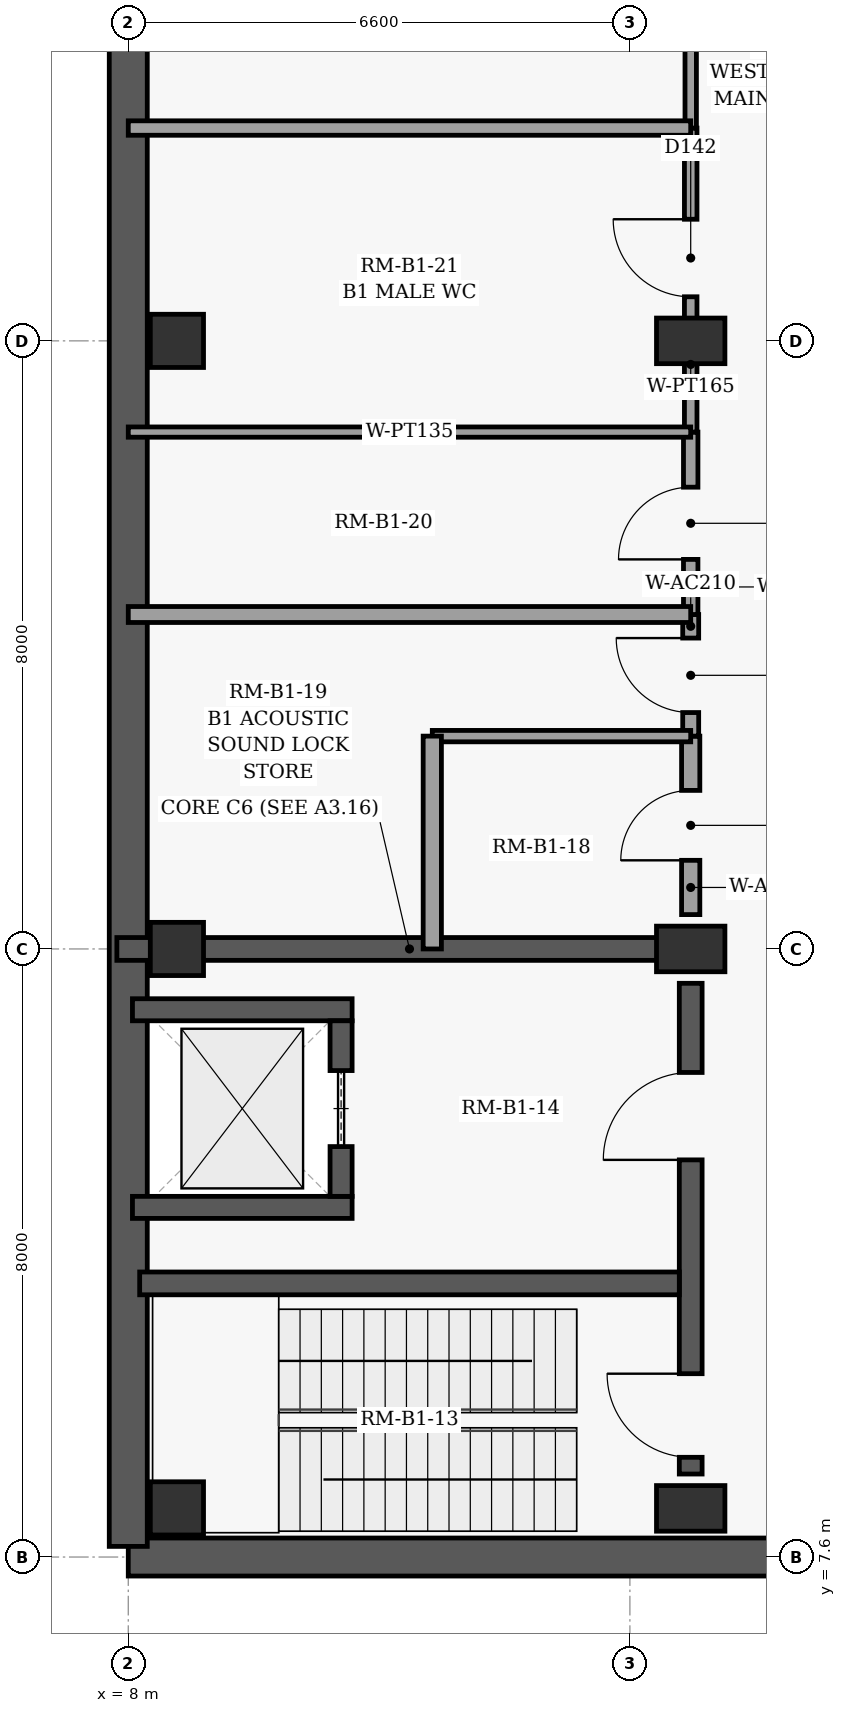
"""IFC4 building model, lengths in metres.
Left out: names, types, materials, properties, quantities, classifications, styles, units other than length and angle.
Written with IfcOpenShell. Run it as: python <this file> out.ifc"""

import sys

from ifc_helpers import new_model, si_unit, direction, frame, frame_2d, origin, origin_2d, place, context, subcontext, project, spatial, rectangle, extrude, element, fill, save


model = new_model("IFC4")
c1 = context("Model", 3, precision=1e-05, world=origin(), true_north=direction((0.0, 1.0)))
c2 = subcontext(c1, "Body", "Model", "MODEL_VIEW")
j1 = project(units=[si_unit("LENGTHUNIT", "METRE"), si_unit("PLANEANGLEUNIT", "RADIAN")], contexts=[c1])
p1 = place(None, origin())
s1 = spatial("IfcSite", under=j1, at=p1, CompositionType="ELEMENT")
p2 = place(p1, origin())
s2 = spatial("IfcBuilding", under=s1, at=p2, CompositionType="ELEMENT")
p3 = place(p2, frame((0.0, 0.0, -4.8)))
s3 = spatial("IfcBuildingStorey", under=s2, at=p3, CompositionType="ELEMENT", Elevation=-4.8)
for number, where, z_axis, x_axis in (
    (1, (8.64, 8.24, 0.0), (0.0, 0.0, 1.0), (1.0, 0.0, 0.0)),
    (2, (8.64, 15.6, 0.0), (0.0, 0.0, 1.0), (1.0, 0.0, 0.0)),
    (3, (8.64, 23.6, 0.0), (0.0, 0.0, 1.0), (1.0, 0.0, 0.0)),
):
    element("IfcColumn", number, at=place(p3, frame(where, z_axis=z_axis, x_axis=x_axis)), inside=s3, PredefinedType="COLUMN", context=c2, shape_type="SweptSolid", body=[
        extrude(rectangle(XDim=0.7, YDim=0.7, at=origin_2d()), origin(), (0.0, 0.0, 1.0), 4.8),
    ])
for number, where, z_axis, x_axis in (
    (4, (15.4, 8.24, 0.0), (0.0, 0.0, 1.0), (1.0, 0.0, 0.0)),
    (5, (15.4, 15.6, 0.0), (0.0, 0.0, 1.0), (1.0, 0.0, 0.0)),
    (6, (15.4, 23.6, 0.0), (0.0, 0.0, 1.0), (1.0, 0.0, 0.0)),
):
    element("IfcColumn", number, at=place(p3, frame(where, z_axis=z_axis, x_axis=x_axis)), inside=s3, PredefinedType="COLUMN", context=c2, shape_type="SweptSolid", body=[
        extrude(rectangle(XDim=0.6, YDim=0.9, at=origin_2d()), origin(), (0.0, 0.0, 1.0), 4.8),
    ])
p4 = place(p3, frame((46.0, 7.6, 0.0), z_axis=(0.0, 0.0, 1.0), x_axis=(-1.0, 0.0, 0.0)))
e7 = element("IfcWall", 7, at=p4, inside=s3, PredefinedType="USERDEFINED", context=c2, shape_type="SweptSolid", body=[
    extrude(rectangle(XDim=38.0, YDim=0.5, at=frame_2d((19.0, 0.0))), origin(), (0.0, 0.0, 1.0), 4.5),
])
p5 = place(p3, frame((8.0, 7.74, 0.0), z_axis=(0.0, 0.0, 1.0), x_axis=(0.0, 1.0, 0.0)))
e8 = element("IfcWall", 8, at=p5, inside=s3, PredefinedType="USERDEFINED", context=c2, shape_type="SweptSolid", body=[
    extrude(rectangle(XDim=55.72, YDim=0.5, at=frame_2d((27.86, 0.0))), origin(), (0.0, 0.0, 1.0), 4.5),
])
p6 = place(p3, frame((7.85, 15.6, 0.0), z_axis=(0.0, 0.0, 1.0), x_axis=(1.0, 0.0, 0.0)))
e9 = element("IfcWall", 9, at=p6, inside=s3, PredefinedType="SHEAR", context=c2, shape_type="SweptSolid", body=[
    extrude(rectangle(XDim=7.248, YDim=0.3, at=frame_2d((3.624, 0.0))), origin(), (0.0, 0.0, 1.0), 4.5),
])
p7 = place(p3, frame((15.4, 8.692, 0.0), z_axis=(0.0, 0.0, 1.0), x_axis=(0.0, 1.0, 0.0)))
e10 = element("IfcWall", 10, at=p7, inside=s3, PredefinedType="SHEAR", context=c2, shape_type="SweptSolid", body=[
    extrude(rectangle(XDim=6.456, YDim=0.3, at=frame_2d((3.228, 0.0))), origin(), (0.0, 0.0, 1.0), 4.5),
])
p8 = place(p7, frame((0.22, 0.0, 0.0)))
e11 = element("IfcOpeningElement", 11, at=p8, cuts=e10, PredefinedType="OPENING", context=c2, shape_type="SweptSolid", body=[
    extrude(rectangle(XDim=1.1, YDim=2.15, at=frame_2d((0.55, 1.075))), frame((0.0, 0.16, 0.0), z_axis=(0.0, -1.0, 0.0), x_axis=(1.0, 0.0, 0.0)), (0.0, 0.0, 1.0), 0.32),
])
p9 = place(p7, frame((4.133, 0.0, 0.0)))
e12 = element("IfcOpeningElement", 12, at=p9, cuts=e10, PredefinedType="OPENING", context=c2, shape_type="SweptSolid", body=[
    extrude(rectangle(XDim=1.15, YDim=2.2, at=frame_2d((0.575, 1.1))), frame((0.0, 0.16, 0.0), z_axis=(0.0, -1.0, 0.0), x_axis=(1.0, 0.0, 0.0)), (0.0, 0.0, 1.0), 0.32),
])
p10 = place(p3, frame((8.15, 11.2, 0.0), z_axis=(0.0, 0.0, 1.0), x_axis=(1.0, 0.0, 0.0)))
e13 = element("IfcWall", 13, at=p10, inside=s3, PredefinedType="SHEAR", context=c2, shape_type="SweptSolid", body=[
    extrude(rectangle(XDim=7.1, YDim=0.3, at=frame_2d((3.55, 0.0))), origin(), (0.0, 0.0, 1.0), 4.5),
])
for number, where, z_axis, x_axis in (
    (14, (8.055, 12.2, 0.0), (0.0, 0.0, 1.0), (1.0, 0.0, 0.0)),
    (15, (8.055, 14.8, 0.0), (0.0, 0.0, 1.0), (1.0, 0.0, 0.0)),
):
    element("IfcWall", number, at=place(p3, frame(where, z_axis=z_axis, x_axis=x_axis)), inside=s3, PredefinedType="SHEAR", context=c2, shape_type="SweptSolid", body=[
        extrude(rectangle(XDim=2.89, YDim=0.29, at=frame_2d((1.445, 0.0))), origin(), (0.0, 0.0, 1.0), 4.5),
    ])
p11 = place(p3, frame((10.8, 12.345, 0.0), z_axis=(0.0, 0.0, 1.0), x_axis=(0.0, 1.0, 0.0)))
e16 = element("IfcWall", 16, at=p11, inside=s3, PredefinedType="SHEAR", context=c2, shape_type="SweptSolid", body=[
    extrude(rectangle(XDim=2.31, YDim=0.29, at=frame_2d((1.155, 0.0))), origin(), (0.0, 0.0, 1.0), 4.5),
])
p12 = place(p11, frame((0.655, 0.0, 0.0)))
e17 = element("IfcOpeningElement", 17, at=p12, cuts=e16, PredefinedType="OPENING", context=c2, shape_type="SweptSolid", body=[
    extrude(rectangle(XDim=1.0, YDim=2.15, at=frame_2d((0.5, 1.075))), frame((0.0, 0.155, 0.0), z_axis=(0.0, -1.0, 0.0), x_axis=(1.0, 0.0, 0.0)), (0.0, 0.0, 1.0), 0.31),
])
p13 = place(p3, frame((15.4, 16.052, 0.0), z_axis=(0.0, 0.0, 1.0), x_axis=(0.0, 1.0, 0.0)))
e18 = element("IfcWall", 18, at=p13, inside=s3, PredefinedType="PARTITIONING", context=c2, shape_type="SweptSolid", body=[
    extrude(rectangle(XDim=2.348, YDim=0.24, at=frame_2d((1.174, 0.0))), origin(), (0.0, 0.0, 1.0), 3.65),
])
p14 = place(p13, frame((0.714, 0.0, 0.0)))
e19 = element("IfcOpeningElement", 19, at=p14, cuts=e18, PredefinedType="OPENING", context=c2, shape_type="SweptSolid", body=[
    extrude(rectangle(XDim=0.92, YDim=2.1, at=frame_2d((0.46, 1.05))), frame((0.0, 0.13, 0.0), z_axis=(0.0, -1.0, 0.0), x_axis=(1.0, 0.0, 0.0)), (0.0, 0.0, 1.0), 0.26),
])
p15 = place(p3, frame((15.4, 18.4, 0.0), z_axis=(0.0, 0.0, 1.0), x_axis=(0.0, 1.0, 0.0)))
e20 = element("IfcWall", 20, at=p15, inside=s3, PredefinedType="PARTITIONING", context=c2, shape_type="SweptSolid", body=[
    extrude(rectangle(XDim=1.6, YDim=0.21, at=frame_2d((0.8, 0.0))), origin(), (0.0, 0.0, 1.0), 3.65),
])
p16 = place(p15, frame((0.31, 0.0, 0.0)))
e21 = element("IfcOpeningElement", 21, at=p16, cuts=e20, PredefinedType="OPENING", context=c2, shape_type="SweptSolid", body=[
    extrude(rectangle(XDim=0.98, YDim=2.1, at=frame_2d((0.49, 1.05))), frame((0.0, 0.115, 0.0), z_axis=(0.0, -1.0, 0.0), x_axis=(1.0, 0.0, 0.0)), (0.0, 0.0, 1.0), 0.23),
])
p17 = place(p3, frame((15.4, 20.0, 0.0), z_axis=(0.0, 0.0, 1.0), x_axis=(0.0, 1.0, 0.0)))
e22 = element("IfcWall", 22, at=p17, inside=s3, PredefinedType="PARTITIONING", context=c2, shape_type="SweptSolid", body=[
    extrude(rectangle(XDim=2.4, YDim=0.19, at=frame_2d((1.2, 0.0))), origin(), (0.0, 0.0, 1.0), 3.65),
])
p18 = place(p17, frame((0.725, 0.0, 0.0)))
e23 = element("IfcOpeningElement", 23, at=p18, cuts=e22, PredefinedType="OPENING", context=c2, shape_type="SweptSolid", body=[
    extrude(rectangle(XDim=0.95, YDim=2.1, at=frame_2d((0.475, 1.05))), frame((0.0, 0.105, 0.0), z_axis=(0.0, -1.0, 0.0), x_axis=(1.0, 0.0, 0.0)), (0.0, 0.0, 1.0), 0.21),
])
p19 = place(p3, frame((15.4, 22.4, 0.0), z_axis=(0.0, 0.0, 1.0), x_axis=(0.0, 1.0, 0.0)))
e24 = element("IfcWall", 24, at=p19, inside=s3, PredefinedType="PARTITIONING", context=c2, shape_type="SweptSolid", body=[
    extrude(rectangle(XDim=4.0, YDim=0.165, at=frame_2d((2.0, 0.0))), origin(), (0.0, 0.0, 1.0), 3.65),
])
p20 = place(p19, frame((1.78, 0.0, 0.0)))
e25 = element("IfcOpeningElement", 25, at=p20, cuts=e24, PredefinedType="OPENING", context=c2, shape_type="SweptSolid", body=[
    extrude(rectangle(XDim=1.02, YDim=2.1, at=frame_2d((0.51, 1.05))), frame((0.0, 0.093, 0.0), z_axis=(0.0, -1.0, 0.0), x_axis=(1.0, 0.0, 0.0)), (0.0, 0.0, 1.0), 0.185),
])
p21 = place(p3, frame((15.4, 26.4, 0.0), z_axis=(0.0, 0.0, 1.0), x_axis=(0.0, 1.0, 0.0)))
e26 = element("IfcWall", 26, at=p21, inside=s3, PredefinedType="PARTITIONING", context=c2, shape_type="SweptSolid", body=[
    extrude(rectangle(XDim=17.6, YDim=0.15, at=frame_2d((8.8, 0.0))), origin(), (0.0, 0.0, 1.0), 3.65),
])
p22 = place(p21, frame((8.3, 0.0, 0.0)))
e27 = element("IfcOpeningElement", 27, at=p22, cuts=e26, PredefinedType="OPENING", context=c2, shape_type="SweptSolid", body=[
    extrude(rectangle(XDim=1.0, YDim=2.1, at=frame_2d((0.5, 1.05))), frame((0.0, 0.085, 0.0), z_axis=(0.0, -1.0, 0.0), x_axis=(1.0, 0.0, 0.0)), (0.0, 0.0, 1.0), 0.17),
])
p23 = place(p3, frame((12.0, 18.4, 0.0), z_axis=(0.0, 0.0, 1.0), x_axis=(1.0, 0.0, 0.0)))
e28 = element("IfcWall", 28, at=p23, inside=s3, PredefinedType="PARTITIONING", context=c2, shape_type="SweptSolid", body=[
    extrude(rectangle(XDim=3.4, YDim=0.15, at=frame_2d((1.7, 0.0))), origin(), (0.0, 0.0, 1.0), 4.5),
])
p24 = place(p3, frame((12.0, 15.6, 0.0), z_axis=(0.0, 0.0, 1.0), x_axis=(0.0, 1.0, 0.0)))
e29 = element("IfcWall", 29, at=p24, inside=s3, PredefinedType="PARTITIONING", context=c2, shape_type="SweptSolid", body=[
    extrude(rectangle(XDim=2.8, YDim=0.24, at=frame_2d((1.4, 0.0))), origin(), (0.0, 0.0, 1.0), 4.5),
])
p25 = place(p3, frame((8.0, 20.0, 0.0), z_axis=(0.0, 0.0, 1.0), x_axis=(1.0, 0.0, 0.0)))
e30 = element("IfcWall", 30, at=p25, inside=s3, PredefinedType="PARTITIONING", context=c2, shape_type="SweptSolid", body=[
    extrude(rectangle(XDim=7.4, YDim=0.21, at=frame_2d((3.7, 0.0))), origin(), (0.0, 0.0, 1.0), 4.5),
])
p26 = place(p3, frame((8.0, 22.4, 0.0), z_axis=(0.0, 0.0, 1.0), x_axis=(1.0, 0.0, 0.0)))
e31 = element("IfcWall", 31, at=p26, inside=s3, PredefinedType="PARTITIONING", context=c2, shape_type="SweptSolid", body=[
    extrude(rectangle(XDim=7.4, YDim=0.135, at=frame_2d((3.7, 0.0))), origin(), (0.0, 0.0, 1.0), 4.5),
])
p27 = place(p3, frame((8.0, 26.4, 0.0), z_axis=(0.0, 0.0, 1.0), x_axis=(1.0, 0.0, 0.0)))
e32 = element("IfcWall", 32, at=p27, inside=s3, PredefinedType="PARTITIONING", context=c2, shape_type="SweptSolid", body=[
    extrude(rectangle(XDim=7.4, YDim=0.19, at=frame_2d((3.7, 0.0))), origin(), (0.0, 0.0, 1.0), 4.5),
])
p28 = place(p8, origin())
e33 = element("IfcDoor", 33, at=p28, inside=s3, OperationType="SINGLE_SWING_RIGHT", PredefinedType="DOOR", context=c2, shape_type="SweptSolid", body=[
    extrude(rectangle(XDim=1.1, YDim=2.15, at=frame_2d((0.55, 1.075))), frame((0.0, 0.025, 0.0), z_axis=(0.0, -1.0, 0.0), x_axis=(1.0, 0.0, 0.0)), (0.0, 0.0, 1.0), 0.05),
])
fill(e11, e33)
p29 = place(p9, origin())
e34 = element("IfcDoor", 34, at=p29, inside=s3, OperationType="SINGLE_SWING_LEFT", PredefinedType="DOOR", context=c2, shape_type="SweptSolid", body=[
    extrude(rectangle(XDim=1.15, YDim=2.2, at=frame_2d((0.575, 1.1))), frame((0.0, 0.025, 0.0), z_axis=(0.0, -1.0, 0.0), x_axis=(1.0, 0.0, 0.0)), (0.0, 0.0, 1.0), 0.05),
])
fill(e12, e34)
p30 = place(p12, origin())
e35 = element("IfcDoor", 35, at=p30, inside=s3, OperationType="SLIDING_TO_LEFT", PredefinedType="DOOR", context=c2, shape_type="SweptSolid", body=[
    extrude(rectangle(XDim=1.0, YDim=2.15, at=frame_2d((0.5, 1.075))), frame((0.0, 0.025, 0.0), z_axis=(0.0, -1.0, 0.0), x_axis=(1.0, 0.0, 0.0)), (0.0, 0.0, 1.0), 0.05),
])
fill(e17, e35)
p31 = place(p14, origin())
e36 = element("IfcDoor", 36, at=p31, inside=s3, OperationType="SINGLE_SWING_LEFT", PredefinedType="DOOR", context=c2, shape_type="SweptSolid", body=[
    extrude(rectangle(XDim=0.92, YDim=2.1, at=frame_2d((0.46, 1.05))), frame((0.0, 0.025, 0.0), z_axis=(0.0, -1.0, 0.0), x_axis=(1.0, 0.0, 0.0)), (0.0, 0.0, 1.0), 0.05),
])
fill(e19, e36)
p32 = place(p16, origin())
e37 = element("IfcDoor", 37, at=p32, inside=s3, OperationType="SINGLE_SWING_RIGHT", PredefinedType="DOOR", context=c2, shape_type="SweptSolid", body=[
    extrude(rectangle(XDim=0.98, YDim=2.1, at=frame_2d((0.49, 1.05))), frame((0.0, 0.025, 0.0), z_axis=(0.0, -1.0, 0.0), x_axis=(1.0, 0.0, 0.0)), (0.0, 0.0, 1.0), 0.05),
])
fill(e21, e37)
p33 = place(p18, origin())
e38 = element("IfcDoor", 38, at=p33, inside=s3, OperationType="SINGLE_SWING_LEFT", PredefinedType="DOOR", context=c2, shape_type="SweptSolid", body=[
    extrude(rectangle(XDim=0.95, YDim=2.1, at=frame_2d((0.475, 1.05))), frame((0.0, 0.025, 0.0), z_axis=(0.0, -1.0, 0.0), x_axis=(1.0, 0.0, 0.0)), (0.0, 0.0, 1.0), 0.05),
])
fill(e23, e38)
p34 = place(p20, origin())
e39 = element("IfcDoor", 39, at=p34, inside=s3, OperationType="SINGLE_SWING_RIGHT", PredefinedType="DOOR", context=c2, shape_type="SweptSolid", body=[
    extrude(rectangle(XDim=1.02, YDim=2.1, at=frame_2d((0.51, 1.05))), frame((0.0, 0.025, 0.0), z_axis=(0.0, -1.0, 0.0), x_axis=(1.0, 0.0, 0.0)), (0.0, 0.0, 1.0), 0.05),
])
fill(e25, e39)
save(model, sys.argv[1])
